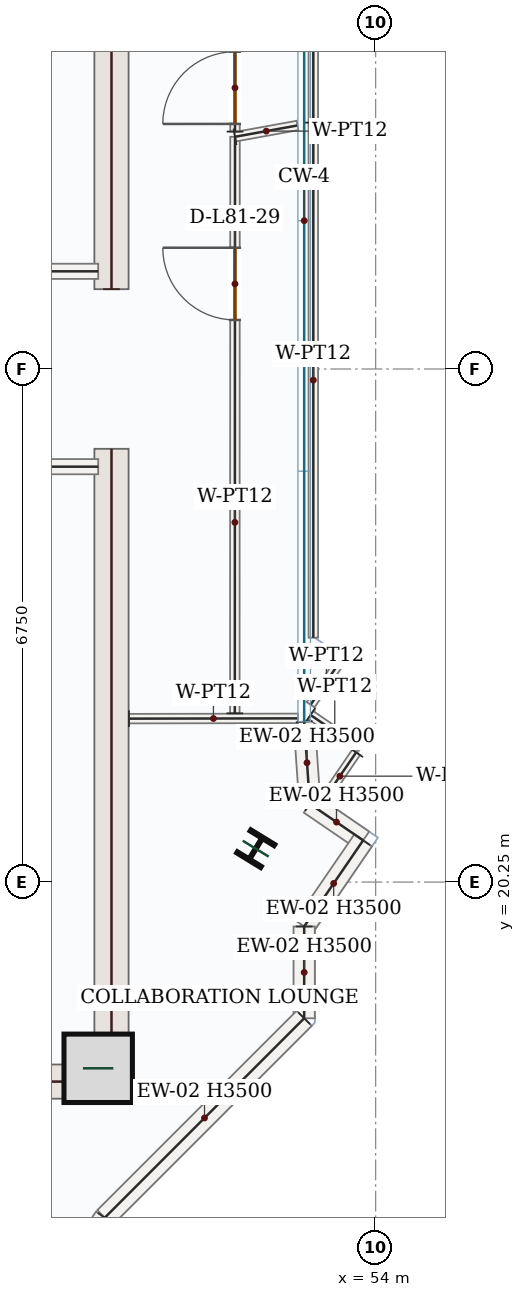
"""IFC4 building model, lengths in metres.
Left out: names, types, materials, properties, quantities, classifications, styles, units other than length and angle.
Written with IfcOpenShell. Run it as: python <this file> out.ifc"""

import sys

from ifc_helpers import new_model, si_unit, direction, frame, frame_2d, origin, origin_2d, place, context, subcontext, project, spatial, rectangle, i_section, extrude, source, transform, mapped, element, fill, save


model = new_model("IFC4")
c1 = context("Model", 3, precision=1e-05, world=origin(), true_north=direction((0.0, 1.0)))
c2 = subcontext(c1, "Body", "Model", "MODEL_VIEW")
j1 = project(units=[si_unit("LENGTHUNIT", "METRE"), si_unit("PLANEANGLEUNIT", "RADIAN")], contexts=[c1])
p1 = place(None, origin())
s1 = spatial("IfcSite", under=j1, at=p1, CompositionType="ELEMENT")
p2 = place(p1, origin())
s2 = spatial("IfcBuilding", under=s1, at=p2, CompositionType="ELEMENT")
p3 = place(p2, frame((0.0, 0.0, 334.8)))
s3 = spatial("IfcBuildingStorey", under=s2, at=p3, CompositionType="ELEMENT", Elevation=334.8)
m1 = source(origin(), c2, "Body", "SweptSolid", [
    extrude(rectangle(XDim=8.55, YDim=0.45, at=frame_2d((4.275, 0.0))), origin(), (0.0, 0.0, 1.0), 3.5),
])
for number, where, z_axis, x_axis in (
    (1, (50.525, 17.4, 0.0), (0.0, 0.0, 1.0), (0.0, 1.0, 0.0)),
    (2, (50.525, 28.05, 0.0), (0.0, 0.0, 1.0), (0.0, 1.0, 0.0)),
):
    element("IfcWall", number, at=place(p3, frame(where, z_axis=z_axis, x_axis=x_axis)), inside=s3, PredefinedType="SHEAR", context=c2, shape_type="MappedRepresentation", body=[
        mapped(m1, transform((0.0, 0.0, 0.0), x_axis=(1.0, 0.0, 0.0), y_axis=(0.0, 1.0, 0.0), z_axis=(0.0, 0.0, 1.0), scale=1.0)),
    ])
m2 = source(origin(), c2, "Body", "SweptSolid", [
    extrude(rectangle(XDim=7.1, YDim=0.45, at=frame_2d((3.55, 0.0))), origin(), (0.0, 0.0, 1.0), 3.5),
])
p4 = place(p3, frame((43.2, 17.625, 0.0), z_axis=(0.0, 0.0, 1.0), x_axis=(1.0, 0.0, 0.0)))
e3 = element("IfcWall", 3, at=p4, inside=s3, PredefinedType="SHEAR", context=c2, shape_type="MappedRepresentation", body=[
    mapped(m2, transform((0.0, 0.0, 0.0), x_axis=(1.0, 0.0, 0.0), y_axis=(0.0, 1.0, 0.0), z_axis=(0.0, 0.0, 1.0), scale=1.0)),
])
m3 = source(origin(), c2, "Body", "SweptSolid", [
    extrude(rectangle(XDim=0.9, YDim=0.9, at=origin_2d()), origin(), (0.0, 0.0, 1.0), 3.75),
])
p5 = place(p3, frame((50.35, 17.8, 0.0), z_axis=(0.0, 0.0, 1.0), x_axis=(1.0, 0.0, 0.0)))
e4 = element("IfcColumn", 4, at=p5, inside=s3, PredefinedType="COLUMN", context=c2, shape_type="MappedRepresentation", body=[
    mapped(m3, transform((0.0, 0.0, 0.0), x_axis=(1.0, 0.0, 0.0), y_axis=(0.0, 1.0, 0.0), z_axis=(0.0, 0.0, 1.0), scale=1.0)),
])
m4 = source(origin(), c2, "Body", "SweptSolid", [
    extrude(i_section(OverallWidth=0.369, OverallDepth=0.356, WebThickness=0.011, FlangeThickness=0.018, FilletRadius=0.018, at=origin_2d()), origin(), (0.0, 0.0, 1.0), 3.75),
])
p6 = place(p3, frame((52.423, 20.689, 0.0), z_axis=(0.0, 0.0, 1.0), x_axis=(-0.852640164354, 0.522498564716, 0.0)))
e5 = element("IfcColumn", 5, at=p6, inside=s3, PredefinedType="COLUMN", context=c2, shape_type="MappedRepresentation", body=[
    mapped(m4, transform((0.0, 0.0, 0.0), x_axis=(1.0, 0.0, 0.0), y_axis=(0.0, 1.0, 0.0), z_axis=(0.0, 0.0, 1.0), scale=1.0)),
])
m5 = source(origin(), c2, "Body", "SweptSolid", [
    extrude(rectangle(XDim=1.083, YDim=0.28, at=frame_2d((0.542, 0.0))), origin(), (0.0, 0.0, 1.0), 3.5),
])
p7 = place(p3, frame((53.06, 22.36, 0.0), z_axis=(0.0, 0.0, 1.0), x_axis=(0.068717036618, -0.997636190642, 0.0)))
e6 = element("IfcWall", 6, at=p7, inside=s3, PredefinedType="SOLIDWALL", context=c2, shape_type="MappedRepresentation", body=[
    mapped(m5, transform((0.0, 0.0, 0.0), x_axis=(1.0, 0.0, 0.0), y_axis=(0.0, 1.0, 0.0), z_axis=(0.0, 0.0, 1.0), scale=1.0)),
])
m6 = source(origin(), c2, "Body", "SweptSolid", [
    extrude(rectangle(XDim=0.85, YDim=0.28, at=frame_2d((0.425, 0.0))), origin(), (0.0, 0.0, 1.0), 3.5),
])
p8 = place(p3, frame((53.135, 21.279, 0.0), z_axis=(0.0, 0.0, 1.0), x_axis=(0.825046459993, -0.565064897913, 0.0)))
e7 = element("IfcWall", 7, at=p8, inside=s3, PredefinedType="SOLIDWALL", context=c2, shape_type="MappedRepresentation", body=[
    mapped(m6, transform((0.0, 0.0, 0.0), x_axis=(1.0, 0.0, 0.0), y_axis=(0.0, 1.0, 0.0), z_axis=(0.0, 0.0, 1.0), scale=1.0)),
])
m7 = source(origin(), c2, "Body", "SweptSolid", [
    extrude(rectangle(XDim=1.373, YDim=0.28, at=frame_2d((0.687, 0.0))), origin(), (0.0, 0.0, 1.0), 3.5),
])
p9 = place(p3, frame((53.836, 20.799, 0.0), z_axis=(0.0, 0.0, 1.0), x_axis=(-0.564875120833, -0.825176404088, 0.0)))
e8 = element("IfcWall", 8, at=p9, inside=s3, PredefinedType="SOLIDWALL", context=c2, shape_type="MappedRepresentation", body=[
    mapped(m7, transform((0.0, 0.0, 0.0), x_axis=(1.0, 0.0, 0.0), y_axis=(0.0, 1.0, 0.0), z_axis=(0.0, 0.0, 1.0), scale=1.0)),
])
m8 = source(origin(), c2, "Body", "SweptSolid", [
    extrude(rectangle(XDim=1.208, YDim=0.28, at=frame_2d((0.604, 0.0))), origin(), (0.0, 0.0, 1.0), 3.5),
])
p10 = place(p3, frame((53.06, 19.666, 0.0), z_axis=(0.0, 0.0, 1.0), x_axis=(0.0, -1.0, 0.0)))
e9 = element("IfcWall", 9, at=p10, inside=s3, PredefinedType="SOLIDWALL", context=c2, shape_type="MappedRepresentation", body=[
    mapped(m8, transform((0.0, 0.0, 0.0), x_axis=(1.0, 0.0, 0.0), y_axis=(0.0, 1.0, 0.0), z_axis=(0.0, 0.0, 1.0), scale=1.0)),
])
m9 = source(origin(), c2, "Body", "SweptSolid", [
    extrude(rectangle(XDim=3.709, YDim=0.28, at=frame_2d((1.855, 0.0))), origin(), (0.0, 0.0, 1.0), 3.5),
])
p11 = place(p3, frame((53.06, 18.458, 0.0), z_axis=(0.0, 0.0, 1.0), x_axis=(-0.707106781187, -0.707106781187, 0.0)))
e10 = element("IfcWall", 10, at=p11, inside=s3, PredefinedType="SOLIDWALL", context=c2, shape_type="MappedRepresentation", body=[
    mapped(m9, transform((0.0, 0.0, 0.0), x_axis=(1.0, 0.0, 0.0), y_axis=(0.0, 1.0, 0.0), z_axis=(0.0, 0.0, 1.0), scale=1.0)),
])
p12 = place(p3, frame((50.437, 15.835, 0.0), z_axis=(0.0, 0.0, 1.0), x_axis=(-0.564961879511, -0.825117006672, 0.0)))
e11 = element("IfcWall", 11, at=p12, inside=s3, PredefinedType="SOLIDWALL", context=c2, shape_type="SweptSolid", body=[
    extrude(rectangle(XDim=3.904, YDim=0.28, at=frame_2d((1.952, 0.0))), origin(), (0.0, 0.0, 1.0), 3.5),
])
p13 = place(p12, frame((1.202, 0.0, 0.85)))
e12 = element("IfcOpeningElement", 12, at=p13, cuts=e11, PredefinedType="OPENING", context=c2, shape_type="SweptSolid", body=[
    extrude(rectangle(XDim=1.5, YDim=1.5, at=frame_2d((0.75, 0.75))), frame((0.0, 0.15, 0.0), z_axis=(0.0, -1.0, 0.0), x_axis=(1.0, 0.0, 0.0)), (0.0, 0.0, 1.0), 0.3),
])
m10 = source(origin(), c2, "Body", "SweptSolid", [
    extrude(rectangle(XDim=4.25, YDim=0.2, at=frame_2d((2.125, 0.0))), origin(), (0.0, 0.0, 1.0), 3.5),
])
for number, where, z_axis, x_axis in (
    (13, (46.1, 25.715, 0.0), (0.0, 0.0, 1.0), (1.0, 0.0, 0.0)),
    (14, (46.1, 28.285, 0.0), (0.0, 0.0, 1.0), (1.0, 0.0, 0.0)),
):
    element("IfcWall", number, at=place(p3, frame(where, z_axis=z_axis, x_axis=x_axis)), inside=s3, PredefinedType="SOLIDWALL", context=c2, shape_type="MappedRepresentation", body=[
        mapped(m10, transform((0.0, 0.0, 0.0), x_axis=(1.0, 0.0, 0.0), y_axis=(0.0, 1.0, 0.0), z_axis=(0.0, 0.0, 1.0), scale=1.0)),
    ])
m11 = source(origin(), c2, "Body", "SweptSolid", [
    extrude(rectangle(XDim=2.223, YDim=0.125, at=frame_2d((1.111, 0.0))), origin(), (0.0, 0.0, 1.0), 3.5),
])
p14 = place(p3, frame((50.755, 22.4, 0.0), z_axis=(0.0, 0.0, 1.0), x_axis=(0.999998642665, 0.00164762518, 0.0)))
e15 = element("IfcWall", 15, at=p14, inside=s3, PredefinedType="PARTITIONING", context=c2, shape_type="MappedRepresentation", body=[
    mapped(m11, transform((0.0, 0.0, 0.0), x_axis=(1.0, 0.0, 0.0), y_axis=(0.0, 1.0, 0.0), z_axis=(0.0, 0.0, 1.0), scale=1.0)),
])
p15 = place(p3, frame((52.147, 22.47, 0.0), z_axis=(0.0, 0.0, 1.0), x_axis=(0.000321874581, 0.999999948198, 0.0)))
e16 = element("IfcWall", 16, at=p15, inside=s3, PredefinedType="PARTITIONING", context=c2, shape_type="SweptSolid", body=[
    extrude(rectangle(XDim=7.585, YDim=0.125, at=frame_2d((3.792, 0.0))), origin(), (0.0, 0.0, 1.0), 3.5),
])
p16 = place(p15, frame((5.175, 0.0, 0.0)))
e17 = element("IfcOpeningElement", 17, at=p16, cuts=e16, PredefinedType="OPENING", context=c2, shape_type="SweptSolid", body=[
    extrude(rectangle(XDim=0.95, YDim=2.15, at=frame_2d((0.475, 1.075))), frame((0.0, 0.073, 0.0), z_axis=(0.0, -1.0, 0.0), x_axis=(1.0, 0.0, 0.0)), (0.0, 0.0, 1.0), 0.145),
])
m12 = source(origin(), c2, "Body", "SweptSolid", [
    extrude(rectangle(XDim=0.836, YDim=0.125, at=frame_2d((0.418, 0.0))), origin(), (0.0, 0.0, 1.0), 3.5),
])
p17 = place(p3, frame((52.15, 30.055, 0.0), z_axis=(0.0, 0.0, 1.0), x_axis=(0.983949253333, 0.178448499195, 0.0)))
e18 = element("IfcWall", 18, at=p17, inside=s3, PredefinedType="PARTITIONING", context=c2, shape_type="MappedRepresentation", body=[
    mapped(m12, transform((0.0, 0.0, 0.0), x_axis=(1.0, 0.0, 0.0), y_axis=(0.0, 1.0, 0.0), z_axis=(0.0, 0.0, 1.0), scale=1.0)),
])
m13 = source(origin(), c2, "Body", "SweptSolid", [
    extrude(rectangle(XDim=6.777, YDim=0.125, at=frame_2d((3.388, 0.0))), origin(), (0.0, 0.0, 1.0), 3.5),
])
p18 = place(p3, frame((53.18, 30.242, 0.0), z_axis=(0.0, 0.0, 1.0), x_axis=(7.2053896e-05, -0.999999997404, 0.0)))
e19 = element("IfcWall", 19, at=p18, inside=s3, PredefinedType="PARTITIONING", context=c2, shape_type="MappedRepresentation", body=[
    mapped(m13, transform((0.0, 0.0, 0.0), x_axis=(1.0, 0.0, 0.0), y_axis=(0.0, 1.0, 0.0), z_axis=(0.0, 0.0, 1.0), scale=1.0)),
])
m14 = source(origin(), c2, "Body", "SweptSolid", [
    extrude(rectangle(XDim=0.738, YDim=0.125, at=frame_2d((0.369, 0.0))), origin(), (0.0, 0.0, 1.0), 3.5),
])
p19 = place(p3, frame((53.56, 23.193, 0.0), z_axis=(0.0, 0.0, 1.0), x_axis=(-0.563069892808, -0.826409278634, 0.0)))
e20 = element("IfcWall", 20, at=p19, inside=s3, PredefinedType="PARTITIONING", context=c2, shape_type="MappedRepresentation", body=[
    mapped(m14, transform((0.0, 0.0, 0.0), x_axis=(1.0, 0.0, 0.0), y_axis=(0.0, 1.0, 0.0), z_axis=(0.0, 0.0, 1.0), scale=1.0)),
])
m15 = source(origin(), c2, "Body", "SweptSolid", [
    extrude(rectangle(XDim=0.773, YDim=0.125, at=frame_2d((0.387, 0.0))), origin(), (0.0, 0.0, 1.0), 3.5),
])
p20 = place(p3, frame((53.143, 22.448, 0.0), z_axis=(0.0, 0.0, 1.0), x_axis=(0.825237562889, -0.56478576894, 0.0)))
e21 = element("IfcWall", 21, at=p20, inside=s3, PredefinedType="PARTITIONING", context=c2, shape_type="MappedRepresentation", body=[
    mapped(m15, transform((0.0, 0.0, 0.0), x_axis=(1.0, 0.0, 0.0), y_axis=(0.0, 1.0, 0.0), z_axis=(0.0, 0.0, 1.0), scale=1.0)),
])
m16 = source(origin(), c2, "Body", "SweptSolid", [
    extrude(rectangle(XDim=0.757, YDim=0.125, at=frame_2d((0.379, 0.0))), origin(), (0.0, 0.0, 1.0), 3.5),
])
p21 = place(p3, frame((53.743, 21.956, 0.0), z_axis=(0.0, 0.0, 1.0), x_axis=(-0.564406554972, -0.825496965896, 0.0)))
e22 = element("IfcWall", 22, at=p21, inside=s3, PredefinedType="PARTITIONING", context=c2, shape_type="MappedRepresentation", body=[
    mapped(m16, transform((0.0, 0.0, 0.0), x_axis=(1.0, 0.0, 0.0), y_axis=(0.0, 1.0, 0.0), z_axis=(0.0, 0.0, 1.0), scale=1.0)),
])
m17 = source(origin(), c2, "Body", "SweptSolid", [
    extrude(rectangle(XDim=5.35, YDim=0.125, at=frame_2d((2.675, 0.0))), origin(), (0.0, 0.0, 1.0), 3.5),
])
p22 = place(p3, frame((53.18, 35.592, 0.0), z_axis=(0.0, 0.0, 1.0), x_axis=(0.0, -1.0, 0.0)))
e23 = element("IfcWall", 23, at=p22, inside=s3, PredefinedType="PARTITIONING", context=c2, shape_type="MappedRepresentation", body=[
    mapped(m17, transform((0.0, 0.0, 0.0), x_axis=(1.0, 0.0, 0.0), y_axis=(0.0, 1.0, 0.0), z_axis=(0.0, 0.0, 1.0), scale=1.0)),
])
p23 = place(p3, frame((52.15, 30.124, 0.0), z_axis=(0.0, 0.0, 1.0), x_axis=(-0.000520201074, 0.999999864695, 0.0)))
e24 = element("IfcWall", 24, at=p23, inside=s3, PredefinedType="PARTITIONING", context=c2, shape_type="SweptSolid", body=[
    extrude(rectangle(XDim=1.408, YDim=0.125, at=frame_2d((0.704, 0.0))), origin(), (0.0, 0.0, 1.0), 3.5),
])
p24 = place(p23, frame((0.101, 0.0, 0.0)))
e25 = element("IfcOpeningElement", 25, at=p24, cuts=e24, PredefinedType="OPENING", context=c2, shape_type="SweptSolid", body=[
    extrude(rectangle(XDim=0.95, YDim=2.15, at=frame_2d((0.475, 1.075))), frame((0.0, 0.073, 0.0), z_axis=(0.0, -1.0, 0.0), x_axis=(1.0, 0.0, 0.0)), (0.0, 0.0, 1.0), 0.145),
])
m18 = source(origin(), c2, "Body", "SweptSolid", [
    extrude(rectangle(XDim=0.95, YDim=2.15, at=frame_2d((0.475, 1.075))), frame((0.0, 0.025, 0.0), z_axis=(0.0, -1.0, 0.0), x_axis=(1.0, 0.0, 0.0)), (0.0, 0.0, 1.0), 0.05),
])
p25 = place(p24, origin())
e26 = element("IfcDoor", 26, at=p25, inside=s3, OperationType="SINGLE_SWING_LEFT", PredefinedType="DOOR", context=c2, shape_type="MappedRepresentation", body=[
    mapped(m18, transform((0.0, 0.0, 0.0), x_axis=(1.0, 0.0, 0.0), y_axis=(0.0, 1.0, 0.0), z_axis=(0.0, 0.0, 1.0), scale=1.0)),
])
fill(e25, e26)
p26 = place(p16, origin())
e27 = element("IfcDoor", 27, at=p26, inside=s3, OperationType="SINGLE_SWING_RIGHT", PredefinedType="DOOR", context=c2, shape_type="MappedRepresentation", body=[
    mapped(m18, transform((0.0, 0.0, 0.0), x_axis=(1.0, 0.0, 0.0), y_axis=(0.0, 1.0, 0.0), z_axis=(0.0, 0.0, 1.0), scale=1.0)),
])
fill(e17, e27)
save(model, sys.argv[1])
